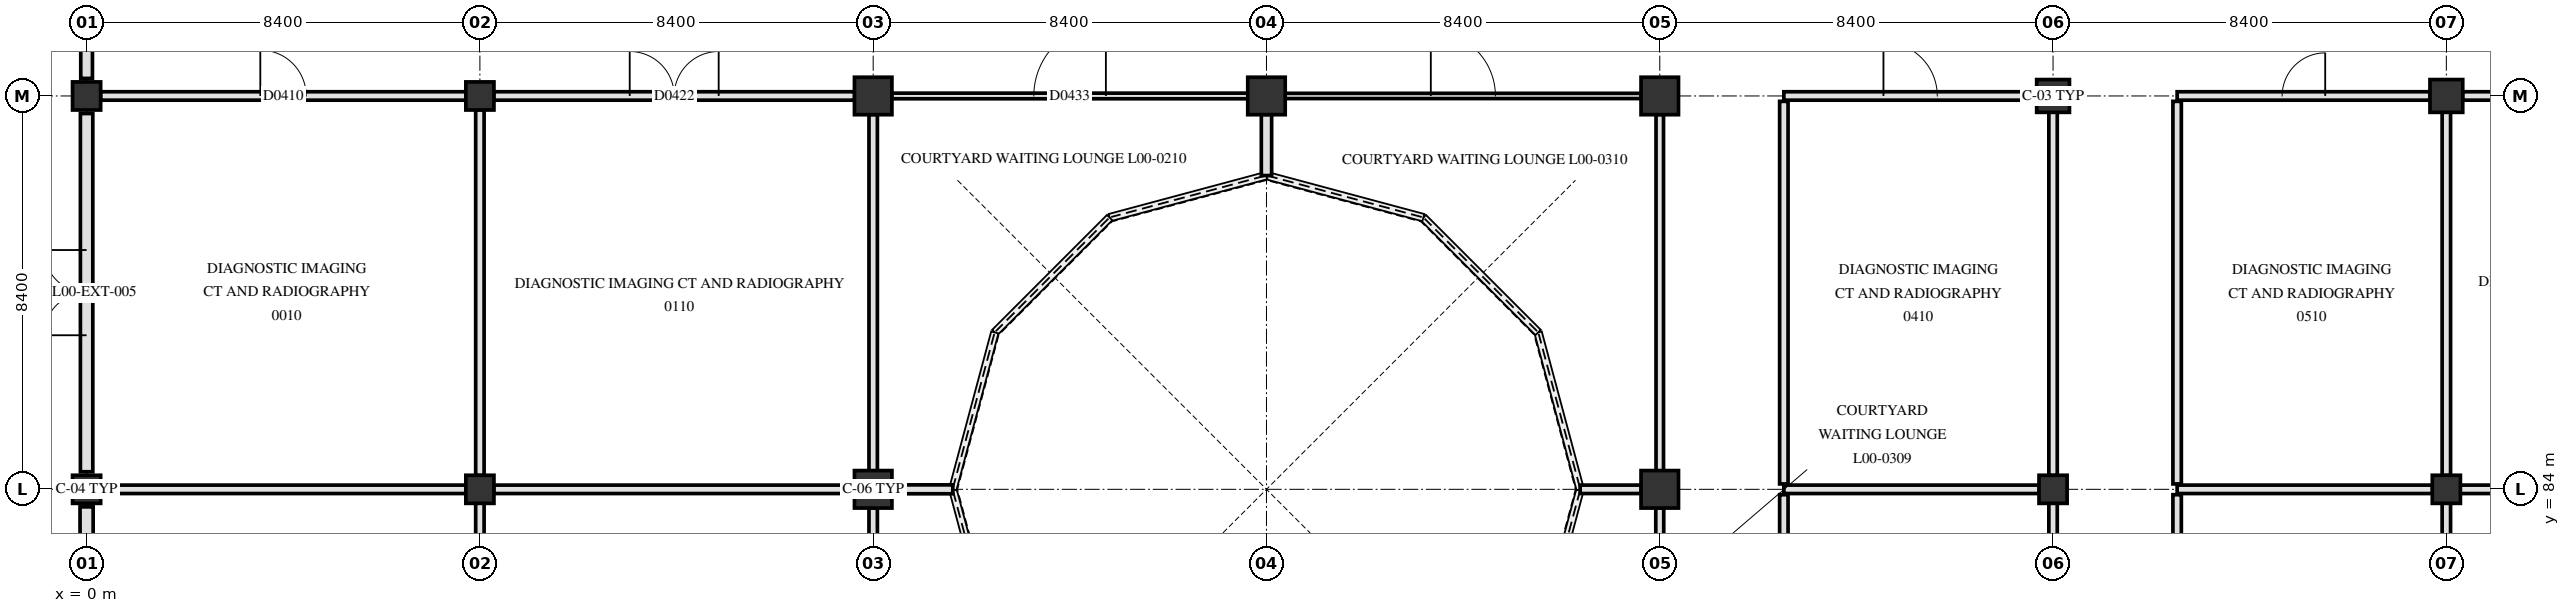
"""IFC4 building model, lengths in metres.
Left out: names, types, materials, properties, quantities, classifications, styles, units other than length and angle.
Written with IfcOpenShell. Run it as: python <this file> out.ifc"""

import sys

from ifc_helpers import new_model, si_unit, direction, frame, frame_2d, origin, origin_2d, place, context, subcontext, project, spatial, rectangle, circle, extrude, element, fill, save


model = new_model("IFC4")
c1 = context("Model", 3, precision=1e-05, world=origin(), true_north=direction((0.0, 1.0)))
c2 = subcontext(c1, "Body", "Model", "MODEL_VIEW")
j1 = project(units=[si_unit("LENGTHUNIT", "METRE"), si_unit("PLANEANGLEUNIT", "RADIAN")], contexts=[c1])
p1 = place(None, origin())
s1 = spatial("IfcSite", under=j1, at=p1, CompositionType="ELEMENT")
p2 = place(p1, origin())
s2 = spatial("IfcBuilding", under=s1, at=p2, CompositionType="ELEMENT")
p3 = place(p2, origin())
s3 = spatial("IfcBuildingStorey", under=s2, at=p3, CompositionType="ELEMENT", Elevation=0.0)
for number, where, z_axis, x_axis in (
    (1, (0.0, 84.0, 0.0), (0.0, 0.0, 1.0), (1.0, 0.0, 0.0)),
    (2, (0.0, 92.4, 0.0), (0.0, 0.0, 1.0), (1.0, 0.0, 0.0)),
    (3, (8.4, 84.0, 0.0), (0.0, 0.0, 1.0), (1.0, 0.0, 0.0)),
    (4, (8.4, 92.4, 0.0), (0.0, 0.0, 1.0), (1.0, 0.0, 0.0)),
):
    element("IfcColumn", number, at=place(p3, frame(where, z_axis=z_axis, x_axis=x_axis)), inside=s3, PredefinedType="COLUMN", context=c2, shape_type="SweptSolid", body=[
        extrude(rectangle(XDim=0.6, YDim=0.6, at=origin_2d()), origin(), (0.0, 0.0, 1.0), 4.8),
    ])
for number, where, z_axis, x_axis in (
    (5, (16.8, 84.0, 0.0), (0.0, 0.0, 1.0), (1.0, 0.0, 0.0)),
    (6, (16.8, 92.4, 0.0), (0.0, 0.0, 1.0), (1.0, 0.0, 0.0)),
    (7, (25.2, 92.4, 0.0), (0.0, 0.0, 1.0), (1.0, 0.0, 0.0)),
    (8, (33.6, 84.0, 0.0), (0.0, 0.0, 1.0), (1.0, 0.0, 0.0)),
    (9, (33.6, 92.4, 0.0), (0.0, 0.0, 1.0), (1.0, 0.0, 0.0)),
):
    element("IfcColumn", number, at=place(p3, frame(where, z_axis=z_axis, x_axis=x_axis)), inside=s3, PredefinedType="COLUMN", context=c2, shape_type="SweptSolid", body=[
        extrude(circle(Radius=0.4, at=origin_2d()), origin(), (0.0, 0.0, 1.0), 4.8),
    ])
p4 = place(p3, frame((42.0, 84.0, 0.0), z_axis=(0.0, 0.0, 1.0), x_axis=(1.0, 0.0, 0.0)))
e10 = element("IfcColumn", 10, at=p4, inside=s3, PredefinedType="COLUMN", context=c2, shape_type="SweptSolid", body=[
    extrude(rectangle(XDim=0.6, YDim=0.6, at=origin_2d()), origin(), (0.0, 0.0, 1.0), 4.8),
])
p5 = place(p3, frame((42.0, 92.4, 0.0), z_axis=(0.0, 0.0, 1.0), x_axis=(1.0, 0.0, 0.0)))
e11 = element("IfcColumn", 11, at=p5, inside=s3, PredefinedType="COLUMN", context=c2, shape_type="SweptSolid", body=[
    extrude(rectangle(XDim=0.7, YDim=0.7, at=origin_2d()), origin(), (0.0, 0.0, 1.0), 4.8),
])
p6 = place(p3, frame((50.4, 84.0, 0.0), z_axis=(0.0, 0.0, 1.0), x_axis=(1.0, 0.0, 0.0)))
e12 = element("IfcColumn", 12, at=p6, inside=s3, PredefinedType="COLUMN", context=c2, shape_type="SweptSolid", body=[
    extrude(rectangle(XDim=0.6, YDim=0.6, at=origin_2d()), origin(), (0.0, 0.0, 1.0), 4.8),
])
p7 = place(p3, frame((50.4, 92.4, 0.0), z_axis=(0.0, 0.0, 1.0), x_axis=(1.0, 0.0, 0.0)))
e13 = element("IfcColumn", 13, at=p7, inside=s3, PredefinedType="COLUMN", context=c2, shape_type="SweptSolid", body=[
    extrude(rectangle(XDim=0.7, YDim=0.7, at=origin_2d()), origin(), (0.0, 0.0, 1.0), 4.8),
])
p8 = place(p3, frame((0.0, 75.975, 0.0), z_axis=(0.0, 0.0, 1.0), x_axis=(0.0, 1.0, 0.0)))
e14 = element("IfcWall", 14, at=p8, inside=s3, PredefinedType="SOLIDWALL", context=c2, shape_type="SweptSolid", body=[
    extrude(rectangle(XDim=7.65, YDim=0.28, at=frame_2d((3.825, 0.0))), origin(), (0.0, 0.0, 1.0), 3.79),
])
p9 = place(p8, frame((1.438, 0.0, 0.85)))
e15 = element("IfcOpeningElement", 15, at=p9, cuts=e14, PredefinedType="OPENING", context=c2, shape_type="SweptSolid", body=[
    extrude(rectangle(XDim=0.95, YDim=1.3, at=frame_2d((0.475, 0.65))), frame((0.0, 0.15, 0.0), z_axis=(0.0, -1.0, 0.0), x_axis=(1.0, 0.0, 0.0)), (0.0, 0.0, 1.0), 0.3),
])
p10 = place(p8, frame((5.212, 0.0, 0.85)))
e16 = element("IfcOpeningElement", 16, at=p10, cuts=e14, PredefinedType="OPENING", context=c2, shape_type="SweptSolid", body=[
    extrude(rectangle(XDim=1.05, YDim=1.3, at=frame_2d((0.525, 0.65))), frame((0.0, 0.15, 0.0), z_axis=(0.0, -1.0, 0.0), x_axis=(1.0, 0.0, 0.0)), (0.0, 0.0, 1.0), 0.3),
])
p11 = place(p3, frame((0.0, 84.375, 0.0), z_axis=(0.0, 0.0, 1.0), x_axis=(0.0, 1.0, 0.0)))
e17 = element("IfcWall", 17, at=p11, inside=s3, PredefinedType="SOLIDWALL", context=c2, shape_type="SweptSolid", body=[
    extrude(rectangle(XDim=7.65, YDim=0.265, at=frame_2d((3.825, 0.0))), origin(), (0.0, 0.0, 1.0), 3.79),
])
p12 = place(p11, frame((2.915, 0.0, 0.0)))
e18 = element("IfcOpeningElement", 18, at=p12, cuts=e17, PredefinedType="OPENING", context=c2, shape_type="SweptSolid", body=[
    extrude(rectangle(XDim=1.82, YDim=2.28, at=frame_2d((0.91, 1.14))), frame((0.0, 0.142, 0.0), z_axis=(0.0, -1.0, 0.0), x_axis=(1.0, 0.0, 0.0)), (0.0, 0.0, 1.0), 0.285),
])
p13 = place(p3, frame((0.0, 92.775, 0.0), z_axis=(0.0, 0.0, 1.0), x_axis=(0.0, 1.0, 0.0)))
e19 = element("IfcWall", 19, at=p13, inside=s3, PredefinedType="SOLIDWALL", context=c2, shape_type="SweptSolid", body=[
    extrude(rectangle(XDim=7.65, YDim=0.25, at=frame_2d((3.825, 0.0))), origin(), (0.0, 0.0, 1.0), 3.79),
])
p14 = place(p13, frame((2.725, 0.0, 0.0)))
e20 = element("IfcOpeningElement", 20, at=p14, cuts=e19, PredefinedType="OPENING", context=c2, shape_type="SweptSolid", body=[
    extrude(rectangle(XDim=2.2, YDim=2.35, at=frame_2d((1.1, 1.175))), frame((0.0, 0.135, 0.0), z_axis=(0.0, -1.0, 0.0), x_axis=(1.0, 0.0, 0.0)), (0.0, 0.0, 1.0), 0.27),
])
p15 = place(p3, frame((0.295, 84.0, 0.0), z_axis=(0.0, 0.0, 1.0), x_axis=(1.0, 0.0, 0.0)))
e21 = element("IfcWall", 21, at=p15, inside=s3, PredefinedType="PARTITIONING", context=c2, shape_type="SweptSolid", body=[
    extrude(rectangle(XDim=7.81, YDim=0.18, at=frame_2d((3.905, 0.0))), origin(), (0.0, 0.0, 1.0), 3.84),
])
p16 = place(p3, frame((8.695, 84.0, 0.0), z_axis=(0.0, 0.0, 1.0), x_axis=(1.0, 0.0, 0.0)))
e22 = element("IfcWall", 22, at=p16, inside=s3, PredefinedType="PARTITIONING", context=c2, shape_type="SweptSolid", body=[
    extrude(rectangle(XDim=7.71, YDim=0.18, at=frame_2d((3.855, 0.0))), origin(), (0.0, 0.0, 1.0), 3.84),
])
p17 = place(p3, frame((17.195, 84.0, 0.0), z_axis=(0.0, 0.0, 1.0), x_axis=(1.0, 0.0, 0.0)))
e23 = element("IfcWall", 23, at=p17, inside=s3, PredefinedType="PARTITIONING", context=c2, shape_type="SweptSolid", body=[
    extrude(rectangle(XDim=1.305, YDim=0.19, at=frame_2d((0.652, 0.0))), origin(), (0.0, 0.0, 1.0), 4.49),
])
p18 = place(p3, frame((31.9, 84.0, 0.0), z_axis=(0.0, 0.0, 1.0), x_axis=(1.0, 0.0, 0.0)))
e24 = element("IfcWall", 24, at=p18, inside=s3, PredefinedType="PARTITIONING", context=c2, shape_type="SweptSolid", body=[
    extrude(rectangle(XDim=1.305, YDim=0.18, at=frame_2d((0.653, 0.0))), origin(), (0.0, 0.0, 1.0), 4.49),
])
for number, where, z_axis, x_axis in (
    (25, (36.25, 84.0, 0.0), (0.0, 0.0, 1.0), (1.0, 0.0, 0.0)),
    (26, (44.65, 84.0, 0.0), (0.0, 0.0, 1.0), (1.0, 0.0, 0.0)),
):
    element("IfcWall", number, at=place(p3, frame(where, z_axis=z_axis, x_axis=x_axis)), inside=s3, PredefinedType="PARTITIONING", context=c2, shape_type="SweptSolid", body=[
        extrude(rectangle(XDim=5.455, YDim=0.18, at=frame_2d((2.728, 0.0))), origin(), (0.0, 0.0, 1.0), 3.84),
    ])
p19 = place(p3, frame((50.695, 84.0, 0.0), z_axis=(0.0, 0.0, 1.0), x_axis=(1.0, 0.0, 0.0)))
e27 = element("IfcWall", 27, at=p19, inside=s3, PredefinedType="PARTITIONING", context=c2, shape_type="SweptSolid", body=[
    extrude(rectangle(XDim=7.81, YDim=0.18, at=frame_2d((3.905, 0.0))), origin(), (0.0, 0.0, 1.0), 3.84),
])
p20 = place(p3, frame((0.295, 92.4, 0.0), z_axis=(0.0, 0.0, 1.0), x_axis=(1.0, 0.0, 0.0)))
e28 = element("IfcWall", 28, at=p20, inside=s3, PredefinedType="PARTITIONING", context=c2, shape_type="SweptSolid", body=[
    extrude(rectangle(XDim=7.81, YDim=0.18, at=frame_2d((3.905, 0.0))), origin(), (0.0, 0.0, 1.0), 3.84),
])
p21 = place(p20, frame((3.415, 0.0, 0.0)))
e29 = element("IfcOpeningElement", 29, at=p21, cuts=e28, PredefinedType="OPENING", context=c2, shape_type="SweptSolid", body=[
    extrude(rectangle(XDim=0.98, YDim=2.12, at=frame_2d((0.49, 1.06))), frame((0.0, 0.1, 0.0), z_axis=(0.0, -1.0, 0.0), x_axis=(1.0, 0.0, 0.0)), (0.0, 0.0, 1.0), 0.2),
])
p22 = place(p3, frame((8.695, 92.4, 0.0), z_axis=(0.0, 0.0, 1.0), x_axis=(1.0, 0.0, 0.0)))
e30 = element("IfcWall", 30, at=p22, inside=s3, PredefinedType="PARTITIONING", context=c2, shape_type="SweptSolid", body=[
    extrude(rectangle(XDim=7.71, YDim=0.18, at=frame_2d((3.855, 0.0))), origin(), (0.0, 0.0, 1.0), 3.84),
])
p23 = place(p22, frame((2.905, 0.0, 0.0)))
e31 = element("IfcOpeningElement", 31, at=p23, cuts=e30, PredefinedType="OPENING", context=c2, shape_type="SweptSolid", body=[
    extrude(rectangle(XDim=1.9, YDim=2.3, at=frame_2d((0.95, 1.15))), frame((0.0, 0.1, 0.0), z_axis=(0.0, -1.0, 0.0), x_axis=(1.0, 0.0, 0.0)), (0.0, 0.0, 1.0), 0.2),
])
p24 = place(p3, frame((17.195, 92.4, 0.0), z_axis=(0.0, 0.0, 1.0), x_axis=(1.0, 0.0, 0.0)))
e32 = element("IfcWall", 32, at=p24, inside=s3, PredefinedType="PARTITIONING", context=c2, shape_type="SweptSolid", body=[
    extrude(rectangle(XDim=7.61, YDim=0.12, at=frame_2d((3.805, 0.0))), origin(), (0.0, 0.0, 1.0), 3.84),
])
p25 = place(p24, frame((3.035, 0.0, 0.0)))
e33 = element("IfcOpeningElement", 33, at=p25, cuts=e32, PredefinedType="OPENING", context=c2, shape_type="SweptSolid", body=[
    extrude(rectangle(XDim=1.54, YDim=2.24, at=frame_2d((0.77, 1.12))), frame((0.0, 0.07, 0.0), z_axis=(0.0, -1.0, 0.0), x_axis=(1.0, 0.0, 0.0)), (0.0, 0.0, 1.0), 0.14),
])
p26 = place(p3, frame((25.595, 92.4, 0.0), z_axis=(0.0, 0.0, 1.0), x_axis=(1.0, 0.0, 0.0)))
e34 = element("IfcWall", 34, at=p26, inside=s3, PredefinedType="PARTITIONING", context=c2, shape_type="SweptSolid", body=[
    extrude(rectangle(XDim=7.61, YDim=0.112, at=frame_2d((3.805, 0.0))), origin(), (0.0, 0.0, 1.0), 3.84),
])
p27 = place(p26, frame((3.115, 0.0, 0.0)))
e35 = element("IfcOpeningElement", 35, at=p27, cuts=e34, PredefinedType="OPENING", context=c2, shape_type="SweptSolid", body=[
    extrude(rectangle(XDim=1.38, YDim=2.22, at=frame_2d((0.69, 1.11))), frame((0.0, 0.066, 0.0), z_axis=(0.0, -1.0, 0.0), x_axis=(1.0, 0.0, 0.0)), (0.0, 0.0, 1.0), 0.132),
])
p28 = place(p3, frame((36.25, 92.4, 0.0), z_axis=(0.0, 0.0, 1.0), x_axis=(1.0, 0.0, 0.0)))
e36 = element("IfcWall", 36, at=p28, inside=s3, PredefinedType="PARTITIONING", context=c2, shape_type="SweptSolid", body=[
    extrude(rectangle(XDim=5.405, YDim=0.18, at=frame_2d((2.703, 0.0))), origin(), (0.0, 0.0, 1.0), 3.84),
])
p29 = place(p28, frame((2.127, 0.0, 0.0)))
e37 = element("IfcOpeningElement", 37, at=p29, cuts=e36, PredefinedType="OPENING", context=c2, shape_type="SweptSolid", body=[
    extrude(rectangle(XDim=1.15, YDim=2.15, at=frame_2d((0.575, 1.075))), frame((0.0, 0.1, 0.0), z_axis=(0.0, -1.0, 0.0), x_axis=(1.0, 0.0, 0.0)), (0.0, 0.0, 1.0), 0.2),
])
p30 = place(p3, frame((44.65, 92.4, 0.0), z_axis=(0.0, 0.0, 1.0), x_axis=(1.0, 0.0, 0.0)))
e38 = element("IfcWall", 38, at=p30, inside=s3, PredefinedType="PARTITIONING", context=c2, shape_type="SweptSolid", body=[
    extrude(rectangle(XDim=5.405, YDim=0.18, at=frame_2d((2.703, 0.0))), origin(), (0.0, 0.0, 1.0), 3.84),
])
p31 = place(p30, frame((2.242, 0.0, 0.0)))
e39 = element("IfcOpeningElement", 39, at=p31, cuts=e38, PredefinedType="OPENING", context=c2, shape_type="SweptSolid", body=[
    extrude(rectangle(XDim=0.92, YDim=2.08, at=frame_2d((0.46, 1.04))), frame((0.0, 0.1, 0.0), z_axis=(0.0, -1.0, 0.0), x_axis=(1.0, 0.0, 0.0)), (0.0, 0.0, 1.0), 0.2),
])
p32 = place(p3, frame((50.745, 92.4, 0.0), z_axis=(0.0, 0.0, 1.0), x_axis=(1.0, 0.0, 0.0)))
e40 = element("IfcWall", 40, at=p32, inside=s3, PredefinedType="PARTITIONING", context=c2, shape_type="SweptSolid", body=[
    extrude(rectangle(XDim=7.71, YDim=0.18, at=frame_2d((3.855, 0.0))), origin(), (0.0, 0.0, 1.0), 3.84),
])
p33 = place(p32, frame((3.18, 0.0, 0.0)))
e41 = element("IfcOpeningElement", 41, at=p33, cuts=e40, PredefinedType="OPENING", context=c2, shape_type="SweptSolid", body=[
    extrude(rectangle(XDim=1.35, YDim=2.2, at=frame_2d((0.675, 1.1))), frame((0.0, 0.1, 0.0), z_axis=(0.0, -1.0, 0.0), x_axis=(1.0, 0.0, 0.0)), (0.0, 0.0, 1.0), 0.2),
])
p34 = place(p3, frame((8.4, 78.315, 0.0), z_axis=(0.0, 0.0, 1.0), x_axis=(0.0, 1.0, 0.0)))
e42 = element("IfcWall", 42, at=p34, inside=s3, PredefinedType="PARTITIONING", context=c2, shape_type="SweptSolid", body=[
    extrude(rectangle(XDim=5.39, YDim=0.18, at=frame_2d((2.695, 0.0))), origin(), (0.0, 0.0, 1.0), 3.89),
])
p35 = place(p3, frame((8.4, 84.295, 0.0), z_axis=(0.0, 0.0, 1.0), x_axis=(0.0, 1.0, 0.0)))
e43 = element("IfcWall", 43, at=p35, inside=s3, PredefinedType="PARTITIONING", context=c2, shape_type="SweptSolid", body=[
    extrude(rectangle(XDim=7.81, YDim=0.18, at=frame_2d((3.905, 0.0))), origin(), (0.0, 0.0, 1.0), 3.89),
])
p36 = place(p3, frame((16.8, 78.315, 0.0), z_axis=(0.0, 0.0, 1.0), x_axis=(0.0, 1.0, 0.0)))
e44 = element("IfcWall", 44, at=p36, inside=s3, PredefinedType="PARTITIONING", context=c2, shape_type="SweptSolid", body=[
    extrude(rectangle(XDim=5.29, YDim=0.18, at=frame_2d((2.645, 0.0))), origin(), (0.0, 0.0, 1.0), 3.89),
])
p37 = place(p3, frame((16.8, 84.395, 0.0), z_axis=(0.0, 0.0, 1.0), x_axis=(0.0, 1.0, 0.0)))
e45 = element("IfcWall", 45, at=p37, inside=s3, PredefinedType="PARTITIONING", context=c2, shape_type="SweptSolid", body=[
    extrude(rectangle(XDim=7.61, YDim=0.18, at=frame_2d((3.805, 0.0))), origin(), (0.0, 0.0, 1.0), 3.89),
])
p38 = place(p3, frame((25.2, 90.7, 0.0), z_axis=(0.0, 0.0, 1.0), x_axis=(0.0, 1.0, 0.0)))
e46 = element("IfcWall", 46, at=p38, inside=s3, PredefinedType="PARTITIONING", context=c2, shape_type="SweptSolid", body=[
    extrude(rectangle(XDim=1.305, YDim=0.22, at=frame_2d((0.652, 0.0))), origin(), (0.0, 0.0, 1.0), 4.49),
])
p39 = place(p3, frame((33.6, 78.315, 0.0), z_axis=(0.0, 0.0, 1.0), x_axis=(0.0, 1.0, 0.0)))
e47 = element("IfcWall", 47, at=p39, inside=s3, PredefinedType="PARTITIONING", context=c2, shape_type="SweptSolid", body=[
    extrude(rectangle(XDim=5.29, YDim=0.17, at=frame_2d((2.645, 0.0))), origin(), (0.0, 0.0, 1.0), 3.89),
])
p40 = place(p3, frame((33.6, 84.395, 0.0), z_axis=(0.0, 0.0, 1.0), x_axis=(0.0, 1.0, 0.0)))
e48 = element("IfcWall", 48, at=p40, inside=s3, PredefinedType="PARTITIONING", context=c2, shape_type="SweptSolid", body=[
    extrude(rectangle(XDim=7.61, YDim=0.16, at=frame_2d((3.805, 0.0))), origin(), (0.0, 0.0, 1.0), 3.89),
])
p41 = place(p3, frame((36.25, 78.315, 0.0), z_axis=(0.0, 0.0, 1.0), x_axis=(0.0, 1.0, 0.0)))
e49 = element("IfcWall", 49, at=p41, inside=s3, PredefinedType="PARTITIONING", context=c2, shape_type="SweptSolid", body=[
    extrude(rectangle(XDim=5.57, YDim=0.18, at=frame_2d((2.785, 0.0))), origin(), (0.0, 0.0, 1.0), 3.84),
])
p42 = place(p3, frame((36.25, 84.115, 0.0), z_axis=(0.0, 0.0, 1.0), x_axis=(0.0, 1.0, 0.0)))
e50 = element("IfcWall", 50, at=p42, inside=s3, PredefinedType="PARTITIONING", context=c2, shape_type="SweptSolid", body=[
    extrude(rectangle(XDim=8.17, YDim=0.18, at=frame_2d((4.085, 0.0))), origin(), (0.0, 0.0, 1.0), 3.84),
])
p43 = place(p3, frame((42.0, 78.315, 0.0), z_axis=(0.0, 0.0, 1.0), x_axis=(0.0, 1.0, 0.0)))
e51 = element("IfcWall", 51, at=p43, inside=s3, PredefinedType="PARTITIONING", context=c2, shape_type="SweptSolid", body=[
    extrude(rectangle(XDim=5.39, YDim=0.18, at=frame_2d((2.695, 0.0))), origin(), (0.0, 0.0, 1.0), 3.89),
])
p44 = place(p3, frame((42.0, 84.295, 0.0), z_axis=(0.0, 0.0, 1.0), x_axis=(0.0, 1.0, 0.0)))
e52 = element("IfcWall", 52, at=p44, inside=s3, PredefinedType="PARTITIONING", context=c2, shape_type="SweptSolid", body=[
    extrude(rectangle(XDim=7.76, YDim=0.18, at=frame_2d((3.88, 0.0))), origin(), (0.0, 0.0, 1.0), 3.89),
])
p45 = place(p3, frame((44.65, 78.315, 0.0), z_axis=(0.0, 0.0, 1.0), x_axis=(0.0, 1.0, 0.0)))
e53 = element("IfcWall", 53, at=p45, inside=s3, PredefinedType="PARTITIONING", context=c2, shape_type="SweptSolid", body=[
    extrude(rectangle(XDim=5.57, YDim=0.18, at=frame_2d((2.785, 0.0))), origin(), (0.0, 0.0, 1.0), 3.84),
])
p46 = place(p3, frame((44.65, 84.115, 0.0), z_axis=(0.0, 0.0, 1.0), x_axis=(0.0, 1.0, 0.0)))
e54 = element("IfcWall", 54, at=p46, inside=s3, PredefinedType="PARTITIONING", context=c2, shape_type="SweptSolid", body=[
    extrude(rectangle(XDim=8.17, YDim=0.18, at=frame_2d((4.085, 0.0))), origin(), (0.0, 0.0, 1.0), 3.84),
])
p47 = place(p3, frame((50.4, 78.315, 0.0), z_axis=(0.0, 0.0, 1.0), x_axis=(0.0, 1.0, 0.0)))
e55 = element("IfcWall", 55, at=p47, inside=s3, PredefinedType="PARTITIONING", context=c2, shape_type="SweptSolid", body=[
    extrude(rectangle(XDim=5.39, YDim=0.18, at=frame_2d((2.695, 0.0))), origin(), (0.0, 0.0, 1.0), 3.89),
])
p48 = place(p3, frame((50.4, 84.295, 0.0), z_axis=(0.0, 0.0, 1.0), x_axis=(0.0, 1.0, 0.0)))
e56 = element("IfcWall", 56, at=p48, inside=s3, PredefinedType="PARTITIONING", context=c2, shape_type="SweptSolid", body=[
    extrude(rectangle(XDim=7.76, YDim=0.18, at=frame_2d((3.88, 0.0))), origin(), (0.0, 0.0, 1.0), 3.89),
])
p49 = place(p12, origin())
e57 = element("IfcDoor", 57, at=p49, inside=s3, OperationType="DOUBLE_SWING_LEFT", PredefinedType="DOOR", context=c2, shape_type="SweptSolid", body=[
    extrude(rectangle(XDim=1.82, YDim=2.28, at=frame_2d((0.91, 1.14))), frame((0.0, 0.025, 0.0), z_axis=(0.0, -1.0, 0.0), x_axis=(1.0, 0.0, 0.0)), (0.0, 0.0, 1.0), 0.05),
])
fill(e18, e57)
p50 = place(p21, origin())
e58 = element("IfcDoor", 58, at=p50, inside=s3, OperationType="SINGLE_SWING_LEFT", PredefinedType="DOOR", context=c2, shape_type="SweptSolid", body=[
    extrude(rectangle(XDim=0.98, YDim=2.12, at=frame_2d((0.49, 1.06))), frame((0.0, 0.025, 0.0), z_axis=(0.0, -1.0, 0.0), x_axis=(1.0, 0.0, 0.0)), (0.0, 0.0, 1.0), 0.05),
])
fill(e29, e58)
p51 = place(p23, origin())
e59 = element("IfcDoor", 59, at=p51, inside=s3, OperationType="DOUBLE_SWING_LEFT", PredefinedType="DOOR", context=c2, shape_type="SweptSolid", body=[
    extrude(rectangle(XDim=1.9, YDim=2.3, at=frame_2d((0.95, 1.15))), frame((0.0, 0.025, 0.0), z_axis=(0.0, -1.0, 0.0), x_axis=(1.0, 0.0, 0.0)), (0.0, 0.0, 1.0), 0.05),
])
fill(e31, e59)
p52 = place(p25, origin())
e60 = element("IfcDoor", 60, at=p52, inside=s3, OperationType="SINGLE_SWING_RIGHT", PredefinedType="DOOR", context=c2, shape_type="SweptSolid", body=[
    extrude(rectangle(XDim=1.54, YDim=2.24, at=frame_2d((0.77, 1.12))), frame((0.0, 0.025, 0.0), z_axis=(0.0, -1.0, 0.0), x_axis=(1.0, 0.0, 0.0)), (0.0, 0.0, 1.0), 0.05),
])
fill(e33, e60)
p53 = place(p27, origin())
e61 = element("IfcDoor", 61, at=p53, inside=s3, OperationType="SINGLE_SWING_LEFT", PredefinedType="DOOR", context=c2, shape_type="SweptSolid", body=[
    extrude(rectangle(XDim=1.38, YDim=2.22, at=frame_2d((0.69, 1.11))), frame((0.0, 0.025, 0.0), z_axis=(0.0, -1.0, 0.0), x_axis=(1.0, 0.0, 0.0)), (0.0, 0.0, 1.0), 0.05),
])
fill(e35, e61)
p54 = place(p29, origin())
e62 = element("IfcDoor", 62, at=p54, inside=s3, OperationType="SINGLE_SWING_LEFT", PredefinedType="DOOR", context=c2, shape_type="SweptSolid", body=[
    extrude(rectangle(XDim=1.15, YDim=2.15, at=frame_2d((0.575, 1.075))), frame((0.0, 0.025, 0.0), z_axis=(0.0, -1.0, 0.0), x_axis=(1.0, 0.0, 0.0)), (0.0, 0.0, 1.0), 0.05),
])
fill(e37, e62)
p55 = place(p31, origin())
e63 = element("IfcDoor", 63, at=p55, inside=s3, OperationType="SINGLE_SWING_RIGHT", PredefinedType="DOOR", context=c2, shape_type="SweptSolid", body=[
    extrude(rectangle(XDim=0.92, YDim=2.08, at=frame_2d((0.46, 1.04))), frame((0.0, 0.025, 0.0), z_axis=(0.0, -1.0, 0.0), x_axis=(1.0, 0.0, 0.0)), (0.0, 0.0, 1.0), 0.05),
])
fill(e39, e63)
save(model, sys.argv[1])
